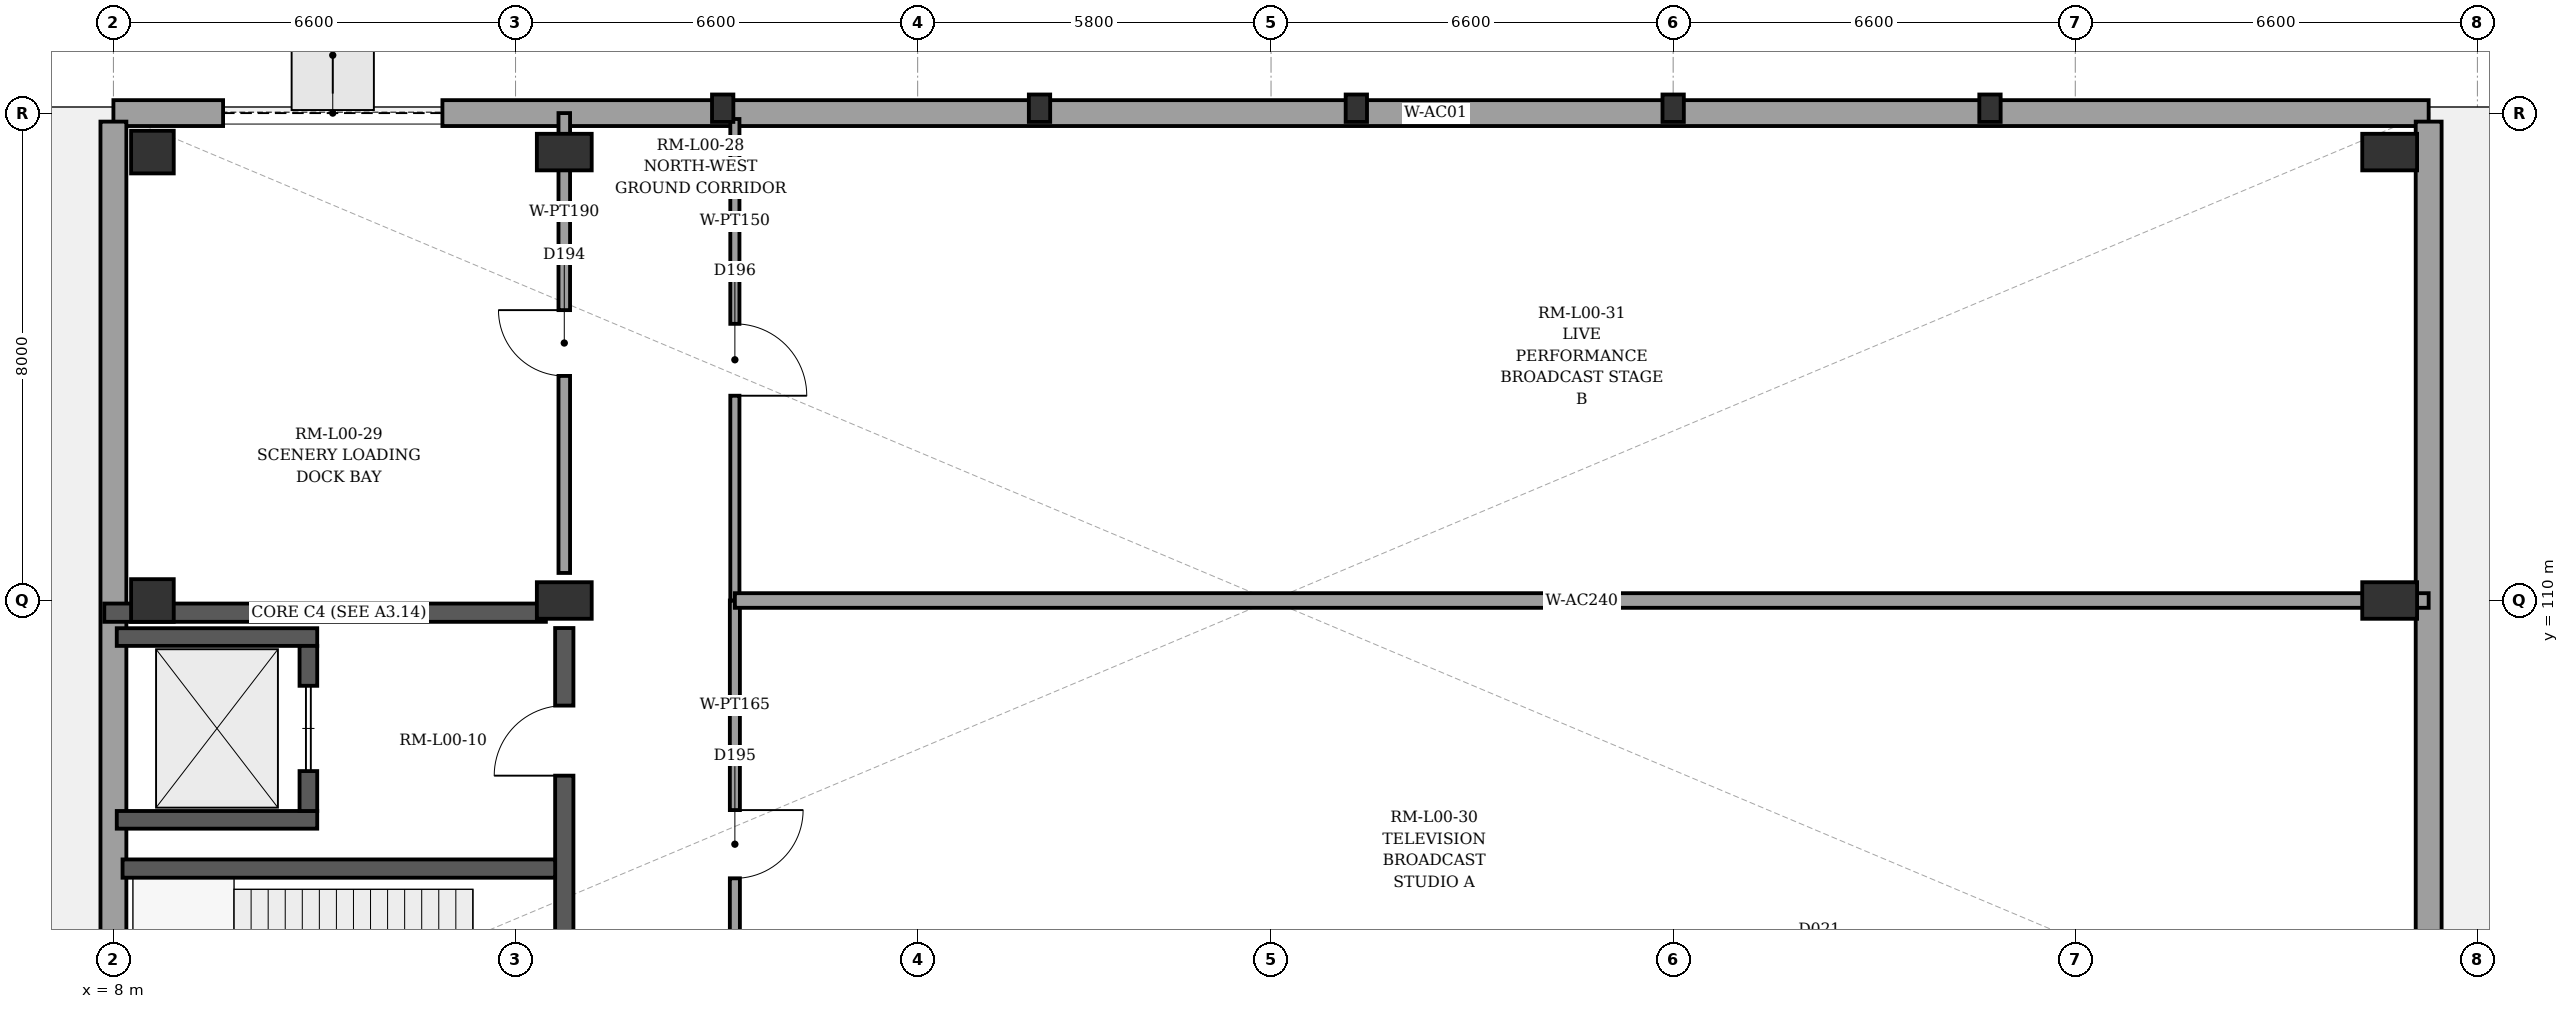
"""IFC4 building model, lengths in metres.
Left out: names, types, materials, properties, quantities, classifications, styles, units other than length and angle.
Written with IfcOpenShell. Run it as: python <this file> out.ifc"""

import sys

from ifc_helpers import new_model, si_unit, direction, frame, frame_2d, origin, origin_2d, place, context, subcontext, project, spatial, rectangle, extrude, element, fill, save


model = new_model("IFC4")
c1 = context("Model", 3, precision=1e-05, world=origin(), true_north=direction((0.0, 1.0)))
c2 = subcontext(c1, "Body", "Model", "MODEL_VIEW")
j1 = project(units=[si_unit("LENGTHUNIT", "METRE"), si_unit("PLANEANGLEUNIT", "RADIAN")], contexts=[c1])
p1 = place(None, origin())
s1 = spatial("IfcSite", under=j1, at=p1, CompositionType="ELEMENT")
p2 = place(p1, origin())
s2 = spatial("IfcBuilding", under=s1, at=p2, CompositionType="ELEMENT")
p3 = place(p2, origin())
s3 = spatial("IfcBuildingStorey", under=s2, at=p3, CompositionType="ELEMENT", Elevation=0.0)
for number, where, z_axis, x_axis in (
    (1, (8.64, 110.0, 0.0), (0.0, 0.0, 1.0), (1.0, 0.0, 0.0)),
    (2, (8.64, 117.36, 0.0), (0.0, 0.0, 1.0), (1.0, 0.0, 0.0)),
):
    element("IfcColumn", number, at=place(p3, frame(where, z_axis=z_axis, x_axis=x_axis)), inside=s3, PredefinedType="COLUMN", context=c2, shape_type="SweptSolid", body=[
        extrude(rectangle(XDim=0.7, YDim=0.7, at=origin_2d()), origin(), (0.0, 0.0, 1.0), 5.4),
    ])
for number, where, z_axis, x_axis in (
    (3, (15.4, 110.0, 0.0), (0.0, 0.0, 1.0), (1.0, 0.0, 0.0)),
    (4, (15.4, 117.36, 0.0), (0.0, 0.0, 1.0), (1.0, 0.0, 0.0)),
    (5, (45.36, 110.0, 0.0), (0.0, 0.0, 1.0), (1.0, 0.0, 0.0)),
    (6, (45.36, 117.36, 0.0), (0.0, 0.0, 1.0), (1.0, 0.0, 0.0)),
):
    element("IfcColumn", number, at=place(p3, frame(where, z_axis=z_axis, x_axis=x_axis)), inside=s3, PredefinedType="COLUMN", context=c2, shape_type="SweptSolid", body=[
        extrude(rectangle(XDim=0.6, YDim=0.9, at=origin_2d()), origin(), (0.0, 0.0, 1.0), 5.4),
    ])
for number, where, z_axis, x_axis in (
    (7, (18.0, 118.08, 0.0), (0.0, 0.0, 1.0), (0.0, 1.0, 0.0)),
    (8, (23.2, 118.08, 0.0), (0.0, 0.0, 1.0), (0.0, 1.0, 0.0)),
    (9, (28.4, 118.08, 0.0), (0.0, 0.0, 1.0), (0.0, 1.0, 0.0)),
    (10, (33.6, 118.08, 0.0), (0.0, 0.0, 1.0), (0.0, 1.0, 0.0)),
    (11, (38.8, 118.08, 0.0), (0.0, 0.0, 1.0), (0.0, 1.0, 0.0)),
):
    element("IfcColumn", number, at=place(p3, frame(where, z_axis=z_axis, x_axis=x_axis)), inside=s3, PredefinedType="PILASTER", context=c2, shape_type="SweptSolid", body=[
        extrude(rectangle(XDim=0.35, YDim=0.45, at=origin_2d()), origin(), (0.0, 0.0, 1.0), 5.4),
    ])
p4 = place(p3, frame((8.0, 118.0, 0.0), z_axis=(0.0, 0.0, 1.0), x_axis=(1.0, 0.0, 0.0)))
e12 = element("IfcWall", 12, at=p4, inside=s3, PredefinedType="SOLIDWALL", context=c2, shape_type="SweptSolid", body=[
    extrude(rectangle(XDim=38.0, YDim=0.425, at=frame_2d((19.0, 0.0))), origin(), (0.0, 0.0, 1.0), 5.15),
])
p5 = place(p4, frame((1.8, 0.0, 0.0)))
e13 = element("IfcOpeningElement", 13, at=p5, cuts=e12, PredefinedType="OPENING", context=c2, shape_type="SweptSolid", body=[
    extrude(rectangle(XDim=3.6, YDim=3.8, at=frame_2d((1.8, 1.9))), frame((0.0, 0.222, 0.0), z_axis=(0.0, -1.0, 0.0), x_axis=(1.0, 0.0, 0.0)), (0.0, 0.0, 1.0), 0.445),
])
p6 = place(p3, frame((46.0, 117.86, 0.0), z_axis=(0.0, 0.0, 1.0), x_axis=(0.0, -1.0, 0.0)))
e14 = element("IfcWall", 14, at=p6, inside=s3, PredefinedType="SOLIDWALL", context=c2, shape_type="SweptSolid", body=[
    extrude(rectangle(XDim=15.72, YDim=0.425, at=frame_2d((7.86, 0.0))), origin(), (0.0, 0.0, 1.0), 5.15),
])
p7 = place(p3, frame((8.0, 102.14, 0.0), z_axis=(0.0, 0.0, 1.0), x_axis=(0.0, 1.0, 0.0)))
e15 = element("IfcWall", 15, at=p7, inside=s3, PredefinedType="SOLIDWALL", context=c2, shape_type="SweptSolid", body=[
    extrude(rectangle(XDim=15.72, YDim=0.425, at=frame_2d((7.86, 0.0))), origin(), (0.0, 0.0, 1.0), 5.15),
])
p8 = place(p7, frame((1.1, 0.0, 0.0)))
e16 = element("IfcOpeningElement", 16, at=p8, cuts=e15, PredefinedType="OPENING", context=c2, shape_type="SweptSolid", body=[
    extrude(rectangle(XDim=1.15, YDim=2.2, at=frame_2d((0.575, 1.1))), frame((0.0, 0.222, 0.0), z_axis=(0.0, -1.0, 0.0), x_axis=(1.0, 0.0, 0.0)), (0.0, 0.0, 1.0), 0.445),
])
p9 = place(p3, frame((7.85, 109.8, 0.0), z_axis=(0.0, 0.0, 1.0), x_axis=(1.0, 0.0, 0.0)))
e17 = element("IfcWall", 17, at=p9, inside=s3, PredefinedType="SHEAR", context=c2, shape_type="SweptSolid", body=[
    extrude(rectangle(XDim=7.248, YDim=0.3, at=frame_2d((3.624, 0.0))), origin(), (0.0, 0.0, 1.0), 5.15),
])
p10 = place(p3, frame((15.4, 103.092, 0.0), z_axis=(0.0, 0.0, 1.0), x_axis=(0.0, 1.0, 0.0)))
e18 = element("IfcWall", 18, at=p10, inside=s3, PredefinedType="SHEAR", context=c2, shape_type="SweptSolid", body=[
    extrude(rectangle(XDim=6.456, YDim=0.3, at=frame_2d((3.228, 0.0))), origin(), (0.0, 0.0, 1.0), 5.15),
])
p11 = place(p10, frame((0.22, 0.0, 0.0)))
e19 = element("IfcOpeningElement", 19, at=p11, cuts=e18, PredefinedType="OPENING", context=c2, shape_type="SweptSolid", body=[
    extrude(rectangle(XDim=1.1, YDim=2.15, at=frame_2d((0.55, 1.075))), frame((0.0, 0.16, 0.0), z_axis=(0.0, -1.0, 0.0), x_axis=(1.0, 0.0, 0.0)), (0.0, 0.0, 1.0), 0.32),
])
p12 = place(p10, frame((4.033, 0.0, 0.0)))
e20 = element("IfcOpeningElement", 20, at=p12, cuts=e18, PredefinedType="OPENING", context=c2, shape_type="SweptSolid", body=[
    extrude(rectangle(XDim=1.15, YDim=2.2, at=frame_2d((0.575, 1.1))), frame((0.0, 0.16, 0.0), z_axis=(0.0, -1.0, 0.0), x_axis=(1.0, 0.0, 0.0)), (0.0, 0.0, 1.0), 0.32),
])
p13 = place(p3, frame((8.15, 105.6, 0.0), z_axis=(0.0, 0.0, 1.0), x_axis=(1.0, 0.0, 0.0)))
e21 = element("IfcWall", 21, at=p13, inside=s3, PredefinedType="SHEAR", context=c2, shape_type="SweptSolid", body=[
    extrude(rectangle(XDim=7.1, YDim=0.3, at=frame_2d((3.55, 0.0))), origin(), (0.0, 0.0, 1.0), 5.15),
])
for number, where, z_axis, x_axis in (
    (22, (8.055, 106.4, 0.0), (0.0, 0.0, 1.0), (1.0, 0.0, 0.0)),
    (23, (8.055, 109.4, 0.0), (0.0, 0.0, 1.0), (1.0, 0.0, 0.0)),
):
    element("IfcWall", number, at=place(p3, frame(where, z_axis=z_axis, x_axis=x_axis)), inside=s3, PredefinedType="SHEAR", context=c2, shape_type="SweptSolid", body=[
        extrude(rectangle(XDim=3.29, YDim=0.29, at=frame_2d((1.645, 0.0))), origin(), (0.0, 0.0, 1.0), 5.15),
    ])
p14 = place(p3, frame((11.2, 106.545, 0.0), z_axis=(0.0, 0.0, 1.0), x_axis=(0.0, 1.0, 0.0)))
e24 = element("IfcWall", 24, at=p14, inside=s3, PredefinedType="SHEAR", context=c2, shape_type="SweptSolid", body=[
    extrude(rectangle(XDim=2.71, YDim=0.29, at=frame_2d((1.355, 0.0))), origin(), (0.0, 0.0, 1.0), 5.15),
])
p15 = place(p14, frame((0.655, 0.0, 0.0)))
e25 = element("IfcOpeningElement", 25, at=p15, cuts=e24, PredefinedType="OPENING", context=c2, shape_type="SweptSolid", body=[
    extrude(rectangle(XDim=1.4, YDim=2.25, at=frame_2d((0.7, 1.125))), frame((0.0, 0.155, 0.0), z_axis=(0.0, -1.0, 0.0), x_axis=(1.0, 0.0, 0.0)), (0.0, 0.0, 1.0), 0.31),
])
p16 = place(p3, frame((15.4, 110.452, 0.0), z_axis=(0.0, 0.0, 1.0), x_axis=(0.0, 1.0, 0.0)))
e26 = element("IfcWall", 26, at=p16, inside=s3, PredefinedType="PARTITIONING", context=c2, shape_type="SweptSolid", body=[
    extrude(rectangle(XDim=7.548, YDim=0.19, at=frame_2d((3.774, 0.0))), origin(), (0.0, 0.0, 1.0), 4.4),
])
p17 = place(p16, frame((3.234, 0.0, 0.0)))
e27 = element("IfcOpeningElement", 27, at=p17, cuts=e26, PredefinedType="OPENING", context=c2, shape_type="SweptSolid", body=[
    extrude(rectangle(XDim=1.08, YDim=2.15, at=frame_2d((0.54, 1.075))), frame((0.0, 0.105, 0.0), z_axis=(0.0, -1.0, 0.0), x_axis=(1.0, 0.0, 0.0)), (0.0, 0.0, 1.0), 0.21),
])
p18 = place(p3, frame((18.2, 110.0, 0.0), z_axis=(0.0, 0.0, 1.0), x_axis=(0.0, -1.0, 0.0)))
e28 = element("IfcWall", 28, at=p18, inside=s3, PredefinedType="PARTITIONING", context=c2, shape_type="SweptSolid", body=[
    extrude(rectangle(XDim=8.0, YDim=0.165, at=frame_2d((4.0, 0.0))), origin(), (0.0, 0.0, 1.0), 5.15),
])
p19 = place(p18, frame((3.44, 0.0, 0.0)))
e29 = element("IfcOpeningElement", 29, at=p19, cuts=e28, PredefinedType="OPENING", context=c2, shape_type="SweptSolid", body=[
    extrude(rectangle(XDim=1.12, YDim=2.15, at=frame_2d((0.56, 1.075))), frame((0.0, 0.093, 0.0), z_axis=(0.0, -1.0, 0.0), x_axis=(1.0, 0.0, 0.0)), (0.0, 0.0, 1.0), 0.185),
])
p20 = place(p3, frame((18.2, 117.903, 0.0), z_axis=(0.0, 0.0, 1.0), x_axis=(0.0, -1.0, 0.0)))
e30 = element("IfcWall", 30, at=p20, inside=s3, PredefinedType="PARTITIONING", context=c2, shape_type="SweptSolid", body=[
    extrude(rectangle(XDim=7.903, YDim=0.15, at=frame_2d((3.952, 0.0))), origin(), (0.0, 0.0, 1.0), 5.15),
])
p21 = place(p20, frame((3.362, 0.0, 0.0)))
e31 = element("IfcOpeningElement", 31, at=p21, cuts=e30, PredefinedType="OPENING", context=c2, shape_type="SweptSolid", body=[
    extrude(rectangle(XDim=1.18, YDim=2.15, at=frame_2d((0.59, 1.075))), frame((0.0, 0.085, 0.0), z_axis=(0.0, -1.0, 0.0), x_axis=(1.0, 0.0, 0.0)), (0.0, 0.0, 1.0), 0.17),
])
p22 = place(p3, frame((18.2, 110.0, 0.0), z_axis=(0.0, 0.0, 1.0), x_axis=(1.0, 0.0, 0.0)))
e32 = element("IfcWall", 32, at=p22, inside=s3, PredefinedType="PARTITIONING", context=c2, shape_type="SweptSolid", body=[
    extrude(rectangle(XDim=27.8, YDim=0.24, at=frame_2d((13.9, 0.0))), origin(), (0.0, 0.0, 1.0), 4.3),
])
p23 = place(p5, origin())
e33 = element("IfcDoor", 33, at=p23, inside=s3, OperationType="ROLLINGUP", PredefinedType="GATE", context=c2, shape_type="SweptSolid", body=[
    extrude(rectangle(XDim=3.6, YDim=3.8, at=frame_2d((1.8, 1.9))), frame((0.0, 0.025, 0.0), z_axis=(0.0, -1.0, 0.0), x_axis=(1.0, 0.0, 0.0)), (0.0, 0.0, 1.0), 0.05),
])
fill(e13, e33)
p24 = place(p12, origin())
e34 = element("IfcDoor", 34, at=p24, inside=s3, OperationType="SINGLE_SWING_LEFT", PredefinedType="DOOR", context=c2, shape_type="SweptSolid", body=[
    extrude(rectangle(XDim=1.15, YDim=2.2, at=frame_2d((0.575, 1.1))), frame((0.0, 0.025, 0.0), z_axis=(0.0, -1.0, 0.0), x_axis=(1.0, 0.0, 0.0)), (0.0, 0.0, 1.0), 0.05),
])
fill(e20, e34)
p25 = place(p15, origin())
e35 = element("IfcDoor", 35, at=p25, inside=s3, OperationType="SLIDING_TO_LEFT", PredefinedType="DOOR", context=c2, shape_type="SweptSolid", body=[
    extrude(rectangle(XDim=1.4, YDim=2.25, at=frame_2d((0.7, 1.125))), frame((0.0, 0.025, 0.0), z_axis=(0.0, -1.0, 0.0), x_axis=(1.0, 0.0, 0.0)), (0.0, 0.0, 1.0), 0.05),
])
fill(e25, e35)
p26 = place(p17, origin())
e36 = element("IfcDoor", 36, at=p26, inside=s3, OperationType="SINGLE_SWING_RIGHT", PredefinedType="DOOR", context=c2, shape_type="SweptSolid", body=[
    extrude(rectangle(XDim=1.08, YDim=2.15, at=frame_2d((0.54, 1.075))), frame((0.0, 0.025, 0.0), z_axis=(0.0, -1.0, 0.0), x_axis=(1.0, 0.0, 0.0)), (0.0, 0.0, 1.0), 0.05),
])
fill(e27, e36)
p27 = place(p19, origin())
e37 = element("IfcDoor", 37, at=p27, inside=s3, OperationType="SINGLE_SWING_LEFT", PredefinedType="DOOR", context=c2, shape_type="SweptSolid", body=[
    extrude(rectangle(XDim=1.12, YDim=2.15, at=frame_2d((0.56, 1.075))), frame((0.0, 0.025, 0.0), z_axis=(0.0, -1.0, 0.0), x_axis=(1.0, 0.0, 0.0)), (0.0, 0.0, 1.0), 0.05),
])
fill(e29, e37)
p28 = place(p21, origin())
e38 = element("IfcDoor", 38, at=p28, inside=s3, OperationType="SINGLE_SWING_RIGHT", PredefinedType="DOOR", context=c2, shape_type="SweptSolid", body=[
    extrude(rectangle(XDim=1.18, YDim=2.15, at=frame_2d((0.59, 1.075))), frame((0.0, 0.025, 0.0), z_axis=(0.0, -1.0, 0.0), x_axis=(1.0, 0.0, 0.0)), (0.0, 0.0, 1.0), 0.05),
])
fill(e31, e38)
save(model, sys.argv[1])
